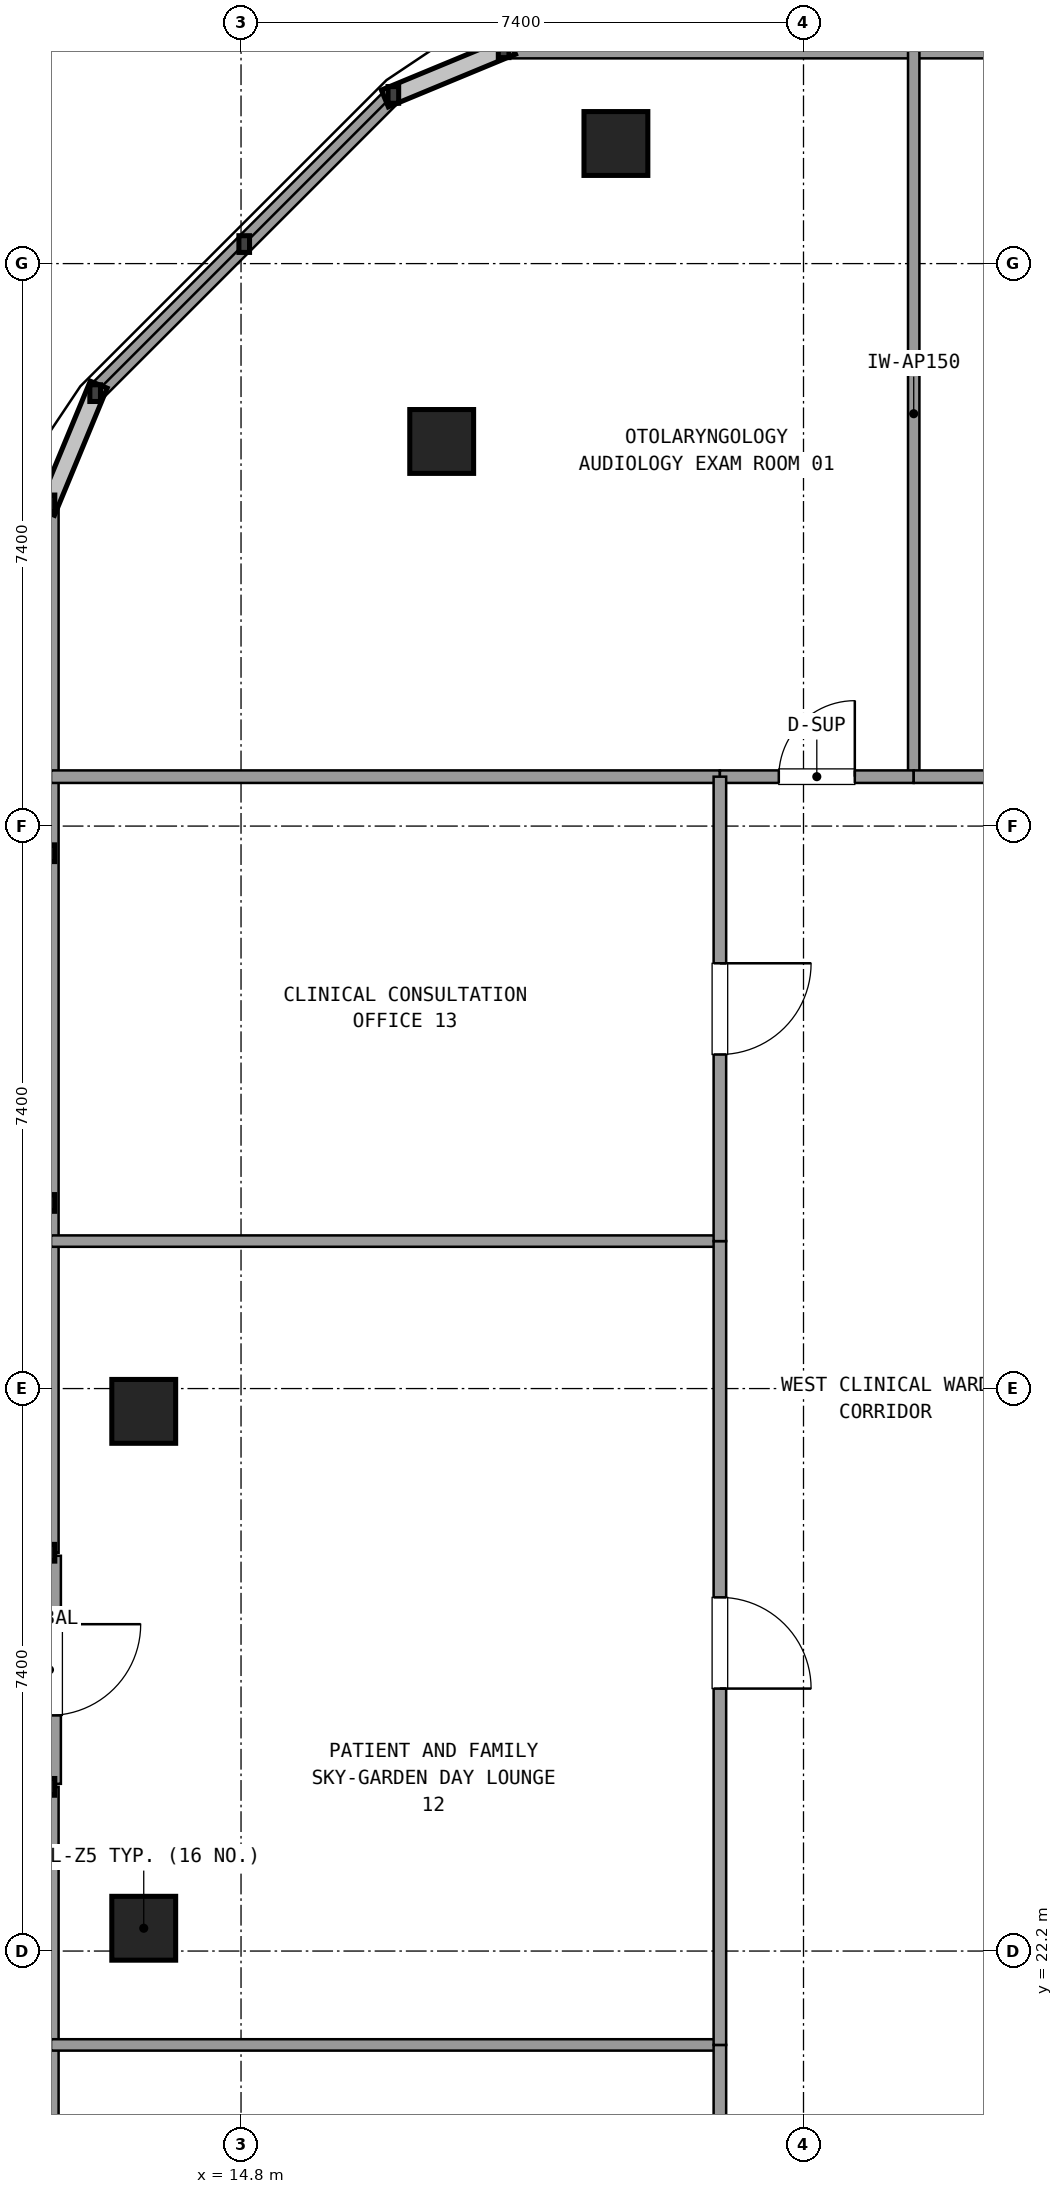
"""IFC4 building model, lengths in metres.
Left out: names, types, materials, properties, quantities, classifications, styles, units other than length and angle.
Written with IfcOpenShell. Run it as: python <this file> out.ifc"""

import sys

from ifc_helpers import new_model, si_unit, direction, frame, frame_2d, origin, origin_2d, place, context, subcontext, project, spatial, rectangle, extrude, element, fill, save


model = new_model("IFC4")
c1 = context("Model", 3, precision=1e-05, world=origin(), true_north=direction((0.0, 1.0)))
c2 = subcontext(c1, "Body", "Model", "MODEL_VIEW")
j1 = project(units=[si_unit("LENGTHUNIT", "METRE"), si_unit("PLANEANGLEUNIT", "RADIAN")], contexts=[c1])
p1 = place(None, origin())
s1 = spatial("IfcSite", under=j1, at=p1, CompositionType="ELEMENT")
p2 = place(p1, origin())
s2 = spatial("IfcBuilding", under=s1, at=p2, CompositionType="ELEMENT")
p3 = place(p2, frame((0.0, 0.0, 257.22)))
s3 = spatial("IfcBuildingStorey", under=s2, at=p3, CompositionType="ELEMENT", Elevation=257.22)
for number, where, z_axis, x_axis in (
    (1, (13.52, 22.5, 0.0), (0.0, 0.0, 1.0), (1.0, 0.0, 0.0)),
    (2, (19.732, 45.98, 0.0), (0.0, 0.0, 1.0), (1.0, 0.0, 0.0)),
    (3, (17.44, 42.06, 0.0), (0.0, 0.0, 1.0), (1.0, 0.0, 0.0)),
    (4, (13.52, 29.3, 0.0), (0.0, 0.0, 1.0), (1.0, 0.0, 0.0)),
):
    element("IfcColumn", number, at=place(p3, frame(where, z_axis=z_axis, x_axis=x_axis)), inside=s3, PredefinedType="COLUMN", context=c2, shape_type="SweptSolid", body=[
        extrude(rectangle(XDim=0.84, YDim=0.84, at=origin_2d()), origin(), (0.0, 0.0, 1.0), 3.6),
    ])
p4 = place(p3, frame((55.745, 47.22, 0.0), z_axis=(0.0, 0.0, 1.0), x_axis=(-1.0, 0.0, 0.0)))
e5 = element("IfcWall", 5, at=p4, inside=s3, PredefinedType="SOLIDWALL", context=c2, shape_type="SweptSolid", body=[
    extrude(rectangle(XDim=37.49, YDim=0.24, at=frame_2d((18.745, 0.0))), origin(), (0.0, 0.0, 1.0), 0.85),
])
p5 = place(p3, frame((16.804, 46.619, 0.0), z_axis=(0.0, 0.0, 1.0), x_axis=(-0.707106781187, -0.707106781187, 0.0)))
e6 = element("IfcWall", 6, at=p5, inside=s3, PredefinedType="SOLIDWALL", context=c2, shape_type="SweptSolid", body=[
    extrude(rectangle(XDim=5.548, YDim=0.24, at=frame_2d((2.774, 0.0))), origin(), (0.0, 0.0, 1.0), 0.85),
])
p6 = place(p3, frame((12.28, 27.4, 0.0), z_axis=(0.0, 0.0, 1.0), x_axis=(0.0, -1.0, 0.0)))
e7 = element("IfcWall", 7, at=p6, inside=s3, PredefinedType="SOLIDWALL", context=c2, shape_type="SweptSolid", body=[
    extrude(rectangle(XDim=3.0, YDim=0.3, at=frame_2d((1.5, 0.0))), origin(), (0.0, 0.0, 1.0), 2.69),
])
p7 = place(p6, frame((0.9, 0.0, 0.0)))
e8 = element("IfcOpeningElement", 8, at=p7, cuts=e7, PredefinedType="OPENING", context=c2, shape_type="SweptSolid", body=[
    extrude(rectangle(XDim=1.2, YDim=2.2, at=frame_2d((0.6, 1.1))), frame((0.0, 0.16, 0.0), z_axis=(0.0, -1.0, 0.0), x_axis=(1.0, 0.0, 0.0)), (0.0, 0.0, 1.0), 0.32),
])
for number, where, z_axis, x_axis in (
    (9, (12.28, 41.245, 0.0), (0.0, 0.0, 1.0), (0.0, -1.0, 0.0)),
    (10, (12.28, 24.36, 0.0), (0.0, 0.0, 1.0), (0.0, -1.0, 0.0)),
):
    element("IfcWall", number, at=place(p3, frame(where, z_axis=z_axis, x_axis=x_axis)), inside=s3, PredefinedType="SOLIDWALL", context=c2, shape_type="SweptSolid", body=[
        extrude(rectangle(XDim=13.805, YDim=0.24, at=frame_2d((6.903, 0.0))), origin(), (0.0, 0.0, 1.0), 0.85),
    ])
p8 = place(p3, frame((12.3, 37.65, 0.0), z_axis=(0.0, 0.0, 1.0), x_axis=(1.0, 0.0, 0.0)))
e11 = element("IfcWall", 11, at=p8, inside=s3, PredefinedType="PARTITIONING", context=c2, shape_type="SweptSolid", body=[
    extrude(rectangle(XDim=8.8, YDim=0.165, at=frame_2d((4.4, 0.0))), origin(), (0.0, 0.0, 1.0), 2.61),
])
p9 = place(p3, frame((23.65, 37.65, 0.0), z_axis=(0.0, 0.0, 1.0), x_axis=(0.0, 1.0, 0.0)))
e12 = element("IfcWall", 12, at=p9, inside=s3, PredefinedType="PARTITIONING", context=c2, shape_type="SweptSolid", body=[
    extrude(rectangle(XDim=9.55, YDim=0.15, at=frame_2d((4.775, 0.0))), origin(), (0.0, 0.0, 1.0), 2.61),
])
p10 = place(p3, frame((21.1, 37.65, 0.0), z_axis=(0.0, 0.0, 1.0), x_axis=(1.0, 0.0, 0.0)))
e13 = element("IfcWall", 13, at=p10, inside=s3, PredefinedType="PARTITIONING", context=c2, shape_type="SweptSolid", body=[
    extrude(rectangle(XDim=2.55, YDim=0.165, at=frame_2d((1.275, 0.0))), origin(), (0.0, 0.0, 1.0), 2.61),
])
p11 = place(p10, frame((0.775, 0.0, 0.0)))
e14 = element("IfcOpeningElement", 14, at=p11, cuts=e13, PredefinedType="OPENING", context=c2, shape_type="SweptSolid", body=[
    extrude(rectangle(XDim=1.0, YDim=2.15, at=frame_2d((0.5, 1.075))), frame((0.0, 0.093, 0.0), z_axis=(0.0, -1.0, 0.0), x_axis=(1.0, 0.0, 0.0)), (0.0, 0.0, 1.0), 0.185),
])
p12 = place(p3, frame((23.65, 37.65, 0.0), z_axis=(0.0, 0.0, 1.0), x_axis=(1.0, 0.0, 0.0)))
e15 = element("IfcWall", 15, at=p12, inside=s3, PredefinedType="PARTITIONING", context=c2, shape_type="SweptSolid", body=[
    extrude(rectangle(XDim=12.876, YDim=0.165, at=frame_2d((6.438, 0.0))), origin(), (0.0, 0.0, 1.0), 2.61),
])
p13 = place(p12, frame((5.838, 0.0, 0.0)))
e16 = element("IfcOpeningElement", 16, at=p13, cuts=e15, PredefinedType="OPENING", context=c2, shape_type="SweptSolid", body=[
    extrude(rectangle(XDim=1.2, YDim=2.15, at=frame_2d((0.6, 1.075))), frame((0.0, 0.093, 0.0), z_axis=(0.0, -1.0, 0.0), x_axis=(1.0, 0.0, 0.0)), (0.0, 0.0, 1.0), 0.185),
])
p14 = place(p3, frame((21.1, 20.965, 0.0), z_axis=(0.0, 0.0, 1.0), x_axis=(-1.0, 0.0, 0.0)))
e17 = element("IfcWall", 17, at=p14, inside=s3, PredefinedType="PARTITIONING", context=c2, shape_type="SweptSolid", body=[
    extrude(rectangle(XDim=8.8, YDim=0.15, at=frame_2d((4.4, 0.0))), origin(), (0.0, 0.0, 1.0), 2.61),
])
p15 = place(p3, frame((21.1, 14.15, 0.0), z_axis=(0.0, 0.0, 1.0), x_axis=(0.0, 1.0, 0.0)))
e18 = element("IfcWall", 18, at=p15, inside=s3, PredefinedType="PARTITIONING", context=c2, shape_type="SweptSolid", body=[
    extrude(rectangle(XDim=6.815, YDim=0.165, at=frame_2d((3.408, 0.0))), origin(), (0.0, 0.0, 1.0), 2.61),
])
p16 = place(p15, frame((2.807, 0.0, 0.0)))
e19 = element("IfcOpeningElement", 19, at=p16, cuts=e18, PredefinedType="OPENING", context=c2, shape_type="SweptSolid", body=[
    extrude(rectangle(XDim=1.2, YDim=2.15, at=frame_2d((0.6, 1.075))), frame((0.0, 0.093, 0.0), z_axis=(0.0, -1.0, 0.0), x_axis=(1.0, 0.0, 0.0)), (0.0, 0.0, 1.0), 0.185),
])
p17 = place(p3, frame((21.1, 31.54, 0.0), z_axis=(0.0, 0.0, 1.0), x_axis=(-1.0, 0.0, 0.0)))
e20 = element("IfcWall", 20, at=p17, inside=s3, PredefinedType="PARTITIONING", context=c2, shape_type="SweptSolid", body=[
    extrude(rectangle(XDim=8.8, YDim=0.15, at=frame_2d((4.4, 0.0))), origin(), (0.0, 0.0, 1.0), 2.61),
])
p18 = place(p3, frame((21.1, 20.965, 0.0), z_axis=(0.0, 0.0, 1.0), x_axis=(0.0, 1.0, 0.0)))
e21 = element("IfcWall", 21, at=p18, inside=s3, PredefinedType="PARTITIONING", context=c2, shape_type="SweptSolid", body=[
    extrude(rectangle(XDim=10.575, YDim=0.165, at=frame_2d((5.288, 0.0))), origin(), (0.0, 0.0, 1.0), 2.61),
])
p19 = place(p18, frame((4.688, 0.0, 0.0)))
e22 = element("IfcOpeningElement", 22, at=p19, cuts=e21, PredefinedType="OPENING", context=c2, shape_type="SweptSolid", body=[
    extrude(rectangle(XDim=1.2, YDim=2.15, at=frame_2d((0.6, 1.075))), frame((0.0, 0.093, 0.0), z_axis=(0.0, -1.0, 0.0), x_axis=(1.0, 0.0, 0.0)), (0.0, 0.0, 1.0), 0.185),
])
p20 = place(p3, frame((21.1, 31.54, 0.0), z_axis=(0.0, 0.0, 1.0), x_axis=(0.0, 1.0, 0.0)))
e23 = element("IfcWall", 23, at=p20, inside=s3, PredefinedType="PARTITIONING", context=c2, shape_type="SweptSolid", body=[
    extrude(rectangle(XDim=6.11, YDim=0.165, at=frame_2d((3.055, 0.0))), origin(), (0.0, 0.0, 1.0), 2.61),
])
p21 = place(p20, frame((2.455, 0.0, 0.0)))
e24 = element("IfcOpeningElement", 24, at=p21, cuts=e23, PredefinedType="OPENING", context=c2, shape_type="SweptSolid", body=[
    extrude(rectangle(XDim=1.2, YDim=2.15, at=frame_2d((0.6, 1.075))), frame((0.0, 0.093, 0.0), z_axis=(0.0, -1.0, 0.0), x_axis=(1.0, 0.0, 0.0)), (0.0, 0.0, 1.0), 0.185),
])
p22 = place(p11, origin())
e25 = element("IfcDoor", 25, at=p22, inside=s3, OperationType="SINGLE_SWING_RIGHT", PredefinedType="DOOR", context=c2, shape_type="SweptSolid", body=[
    extrude(rectangle(XDim=1.0, YDim=2.15, at=frame_2d((0.5, 1.075))), frame((0.0, 0.025, 0.0), z_axis=(0.0, -1.0, 0.0), x_axis=(1.0, 0.0, 0.0)), (0.0, 0.0, 1.0), 0.05),
])
fill(e14, e25)
p23 = place(p19, frame((1.2, 0.0, 0.0), z_axis=(0.0, 0.0, 1.0), x_axis=(-1.0, 0.0, 0.0)))
e26 = element("IfcDoor", 26, at=p23, inside=s3, OperationType="SINGLE_SWING_LEFT", PredefinedType="DOOR", context=c2, shape_type="SweptSolid", body=[
    extrude(rectangle(XDim=1.2, YDim=2.15, at=frame_2d((0.6, 1.075))), frame((0.0, 0.025, 0.0), z_axis=(0.0, -1.0, 0.0), x_axis=(1.0, 0.0, 0.0)), (0.0, 0.0, 1.0), 0.05),
])
fill(e22, e26)
p24 = place(p21, frame((1.2, 0.0, 0.0), z_axis=(0.0, 0.0, 1.0), x_axis=(-1.0, 0.0, 0.0)))
e27 = element("IfcDoor", 27, at=p24, inside=s3, OperationType="SINGLE_SWING_RIGHT", PredefinedType="DOOR", context=c2, shape_type="SweptSolid", body=[
    extrude(rectangle(XDim=1.2, YDim=2.15, at=frame_2d((0.6, 1.075))), frame((0.0, 0.025, 0.0), z_axis=(0.0, -1.0, 0.0), x_axis=(1.0, 0.0, 0.0)), (0.0, 0.0, 1.0), 0.05),
])
fill(e24, e27)
save(model, sys.argv[1])
